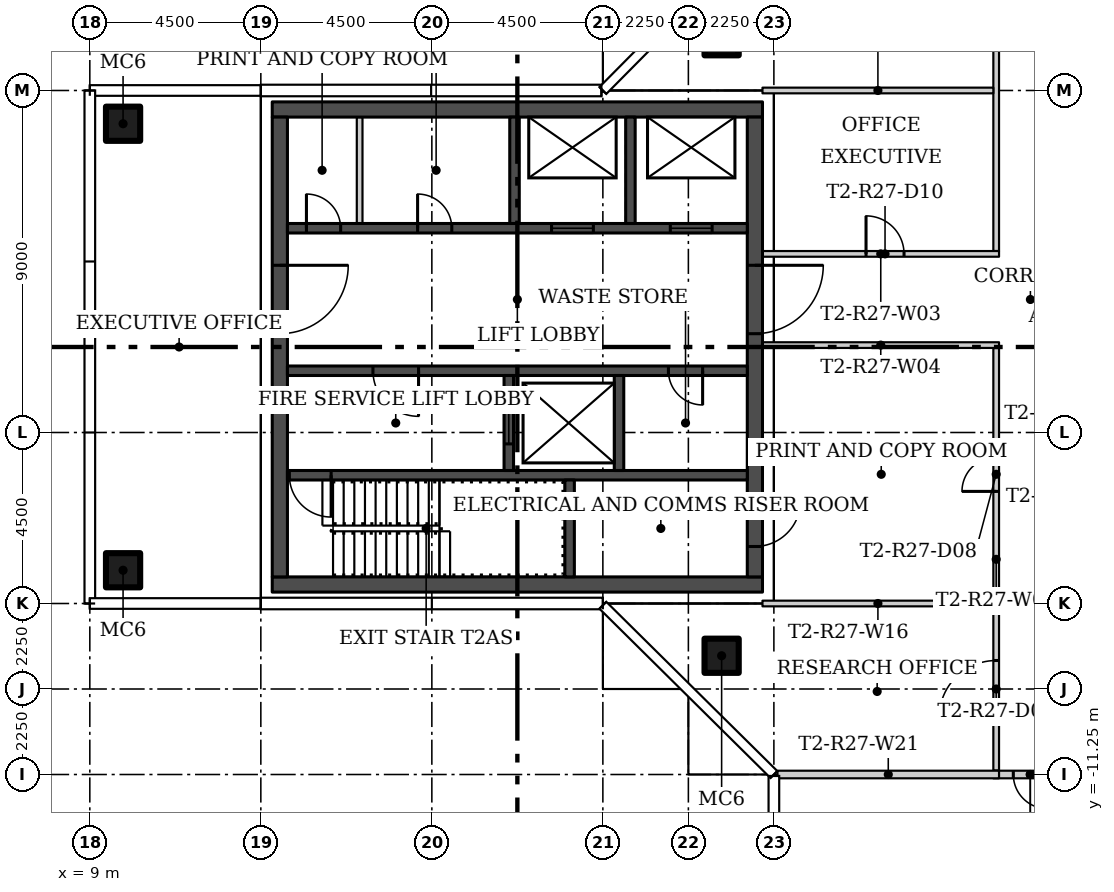
"""IFC4 building model, lengths in metres.
Left out: names, types, materials, properties, quantities, classifications, styles, units other than length and angle.
Written with IfcOpenShell. Run it as: python <this file> out.ifc"""

import sys

from ifc_helpers import new_model, si_unit, direction, frame, frame_2d, origin, origin_2d, place, context, subcontext, project, spatial, rectangle, hollow_rectangle, extrude, element, fill, save


model = new_model("IFC4")
c1 = context("Model", 3, precision=1e-05, world=origin(), true_north=direction((0.0, 1.0)))
c2 = subcontext(c1, "Body", "Model", "MODEL_VIEW")
j1 = project(units=[si_unit("LENGTHUNIT", "METRE"), si_unit("PLANEANGLEUNIT", "RADIAN")], contexts=[c1])
p1 = place(None, origin())
s1 = spatial("IfcSite", under=j1, at=p1, CompositionType="ELEMENT")
p2 = place(p1, origin())
s2 = spatial("IfcBuilding", under=s1, at=p2, CompositionType="ELEMENT")
p3 = place(p2, frame((0.0, 0.0, 249.9)))
s3 = spatial("IfcBuildingStorey", under=s2, at=p3, CompositionType="ELEMENT", Elevation=249.9)
for number, where in (
    (1, (25.625, 8.125, 0.0)),
    (2, (25.625, -8.125, 0.0)),
    (3, (9.875, -5.875, 0.0)),
    (4, (9.875, 5.875, 0.0)),
):
    element("IfcColumn", number, at=place(p3, frame(where)), inside=s3, PredefinedType="COLUMN", context=c2, shape_type="SweptSolid", body=[
        extrude(hollow_rectangle(XDim=0.9, YDim=0.9, WallThickness=0.036, at=origin_2d()), origin(), (0.0, 0.0, 1.0), 3.55),
    ])
p4 = place(p3, frame((32.85, 2.525, 0.0), z_axis=(0.0, 0.0, 1.0), x_axis=(0.0, 1.0, 0.0)))
e5 = element("IfcWall", 5, at=p4, inside=s3, PredefinedType="PARTITIONING", context=c2, shape_type="SweptSolid", body=[
    extrude(rectangle(XDim=13.125, YDim=0.15, at=frame_2d((6.562, 0.0))), origin(), (0.0, 0.0, 1.0), 3.55),
])
p5 = place(p4, frame((7.975, 0.0, 0.0)))
e6 = element("IfcOpeningElement", 6, at=p5, cuts=e5, PredefinedType="OPENING", context=c2, shape_type="SweptSolid", body=[
    extrude(rectangle(XDim=1.5, YDim=2.1, at=frame_2d((0.75, 1.05))), frame((0.0, 0.085, 0.0), z_axis=(0.0, -1.0, 0.0), x_axis=(1.0, 0.0, 0.0)), (0.0, 0.0, 1.0), 0.17),
])
p6 = place(p3, frame((32.85, -11.15, 0.0), z_axis=(0.0, 0.0, 1.0), x_axis=(0.0, 1.0, 0.0)))
e7 = element("IfcWall", 7, at=p6, inside=s3, PredefinedType="PARTITIONING", context=c2, shape_type="SweptSolid", body=[
    extrude(rectangle(XDim=11.125, YDim=0.15, at=frame_2d((5.562, 0.0))), origin(), (0.0, 0.0, 1.0), 3.55),
])
p7 = place(p6, frame((7.35, 0.0, 0.0)))
e8 = element("IfcOpeningElement", 8, at=p7, cuts=e7, PredefinedType="OPENING", context=c2, shape_type="SweptSolid", body=[
    extrude(rectangle(XDim=0.9, YDim=2.1, at=frame_2d((0.45, 1.05))), frame((0.0, 0.085, 0.0), z_axis=(0.0, -1.0, 0.0), x_axis=(1.0, 0.0, 0.0)), (0.0, 0.0, 1.0), 0.17),
])
p8 = place(p6, frame((1.4, 0.0, 0.0)))
e9 = element("IfcOpeningElement", 9, at=p8, cuts=e7, PredefinedType="OPENING", context=c2, shape_type="SweptSolid", body=[
    extrude(rectangle(XDim=1.5, YDim=2.1, at=frame_2d((0.75, 1.05))), frame((0.0, 0.085, 0.0), z_axis=(0.0, -1.0, 0.0), x_axis=(1.0, 0.0, 0.0)), (0.0, 0.0, 1.0), 0.17),
])
p9 = place(p3, frame((26.7, 2.45, 0.0)))
e10 = element("IfcWall", 10, at=p9, inside=s3, PredefinedType="PARTITIONING", context=c2, shape_type="SweptSolid", body=[
    extrude(rectangle(XDim=6.225, YDim=0.15, at=frame_2d((3.112, 0.0))), origin(), (0.0, 0.0, 1.0), 3.55),
])
p10 = place(p9, frame((2.725, 0.0, 0.0)))
e11 = element("IfcOpeningElement", 11, at=p10, cuts=e10, PredefinedType="OPENING", context=c2, shape_type="SweptSolid", body=[
    extrude(rectangle(XDim=1.0, YDim=2.4, at=frame_2d((0.5, 1.2))), frame((0.0, 0.085, 0.0), z_axis=(0.0, -1.0, 0.0), x_axis=(1.0, 0.0, 0.0)), (0.0, 0.0, 1.0), 0.17),
])
p11 = place(p3, frame((32.925, 0.05, 0.0), z_axis=(0.0, 0.0, 1.0), x_axis=(-1.0, 0.0, 0.0)))
e12 = element("IfcWall", 12, at=p11, inside=s3, PredefinedType="PARTITIONING", context=c2, shape_type="SweptSolid", body=[
    extrude(rectangle(XDim=6.225, YDim=0.15, at=frame_2d((3.112, 0.0))), origin(), (0.0, 0.0, 1.0), 3.55),
])
p12 = place(p3, frame((34.713, -11.25, 0.0), z_axis=(0.0, 0.0, 1.0), x_axis=(-1.0, 0.0, 0.0)))
e13 = element("IfcWall", 13, at=p12, inside=s3, PredefinedType="PARTITIONING", context=c2, shape_type="SweptSolid", body=[
    extrude(rectangle(XDim=1.938, YDim=0.2, at=frame_2d((0.969, 0.0))), origin(), (0.0, 0.0, 1.0), 3.55),
])
p13 = place(p12, frame((0.513, 0.0, 0.0)))
e14 = element("IfcOpeningElement", 14, at=p13, cuts=e13, PredefinedType="OPENING", context=c2, shape_type="SweptSolid", body=[
    extrude(rectangle(XDim=0.9, YDim=2.4, at=frame_2d((0.45, 1.2))), frame((0.0, 0.11, 0.0), z_axis=(0.0, -1.0, 0.0), x_axis=(1.0, 0.0, 0.0)), (0.0, 0.0, 1.0), 0.22),
])
p14 = place(p3, frame((32.775, 6.75, 0.0), z_axis=(0.0, 0.0, 1.0), x_axis=(-1.0, 0.0, 0.0)))
e15 = element("IfcWall", 15, at=p14, inside=s3, PredefinedType="PARTITIONING", context=c2, shape_type="SweptSolid", body=[
    extrude(rectangle(XDim=6.075, YDim=0.15, at=frame_2d((3.037, 0.0))), origin(), (0.0, 0.0, 1.0), 3.55),
])
p15 = place(p3, frame((26.7, -6.75, 0.0)))
e16 = element("IfcWall", 16, at=p15, inside=s3, PredefinedType="PARTITIONING", context=c2, shape_type="SweptSolid", body=[
    extrude(rectangle(XDim=6.075, YDim=0.15, at=frame_2d((3.037, 0.0))), origin(), (0.0, 0.0, 1.0), 3.55),
])
p16 = place(p3, frame((27.095, -11.25, 0.0)))
e17 = element("IfcWall", 17, at=p16, inside=s3, PredefinedType="PARTITIONING", context=c2, shape_type="SweptSolid", body=[
    extrude(rectangle(XDim=5.83, YDim=0.2, at=frame_2d((2.915, 0.0))), origin(), (0.0, 0.0, 1.0), 3.55),
])
for number, where in (
    (18, (13.8, -6.25, 0.0)),
    (19, (13.8, 6.25, 0.0)),
):
    element("IfcWall", number, at=place(p3, frame(where)), inside=s3, PredefinedType="SHEAR", context=c2, shape_type="SweptSolid", body=[
        extrude(rectangle(XDim=12.9, YDim=0.4, at=frame_2d((6.45, 0.0))), origin(), (0.0, 0.0, 1.0), 3.55),
    ])
p17 = place(p3, frame((14.0, 6.05, 0.0), z_axis=(0.0, 0.0, 1.0), x_axis=(0.0, -1.0, 0.0)))
e20 = element("IfcWall", 20, at=p17, inside=s3, PredefinedType="SHEAR", context=c2, shape_type="SweptSolid", body=[
    extrude(rectangle(XDim=12.1, YDim=0.4, at=frame_2d((6.05, 0.0))), origin(), (0.0, 0.0, 1.0), 3.55),
])
p18 = place(p17, frame((3.9, 0.0, 0.0)))
e21 = element("IfcOpeningElement", 21, at=p18, cuts=e20, PredefinedType="OPENING", context=c2, shape_type="SweptSolid", body=[
    extrude(rectangle(XDim=1.8, YDim=2.4, at=frame_2d((0.9, 1.2))), frame((0.0, 0.21, 0.0), z_axis=(0.0, -1.0, 0.0), x_axis=(1.0, 0.0, 0.0)), (0.0, 0.0, 1.0), 0.42),
])
p19 = place(p3, frame((26.5, 6.05, 0.0), z_axis=(0.0, 0.0, 1.0), x_axis=(0.0, -1.0, 0.0)))
e22 = element("IfcWall", 22, at=p19, inside=s3, PredefinedType="SHEAR", context=c2, shape_type="SweptSolid", body=[
    extrude(rectangle(XDim=12.1, YDim=0.4, at=frame_2d((6.05, 0.0))), origin(), (0.0, 0.0, 1.0), 3.55),
])
p20 = place(p19, frame((10.1, 0.0, 0.0)))
e23 = element("IfcOpeningElement", 23, at=p20, cuts=e22, PredefinedType="OPENING", context=c2, shape_type="SweptSolid", body=[
    extrude(rectangle(XDim=1.2, YDim=2.1, at=frame_2d((0.6, 1.05))), frame((0.0, 0.21, 0.0), z_axis=(0.0, -1.0, 0.0), x_axis=(1.0, 0.0, 0.0)), (0.0, 0.0, 1.0), 0.42),
])
p21 = place(p19, frame((3.9, 0.0, 0.0)))
e24 = element("IfcOpeningElement", 24, at=p21, cuts=e22, PredefinedType="OPENING", context=c2, shape_type="SweptSolid", body=[
    extrude(rectangle(XDim=1.8, YDim=2.4, at=frame_2d((0.9, 1.2))), frame((0.0, 0.21, 0.0), z_axis=(0.0, -1.0, 0.0), x_axis=(1.0, 0.0, 0.0)), (0.0, 0.0, 1.0), 0.42),
])
p22 = place(p3, frame((26.3, -3.375, 0.0), z_axis=(0.0, 0.0, 1.0), x_axis=(-1.0, 0.0, 0.0)))
e25 = element("IfcWall", 25, at=p22, inside=s3, PredefinedType="SHEAR", context=c2, shape_type="SweptSolid", body=[
    extrude(rectangle(XDim=12.1, YDim=0.25, at=frame_2d((6.05, 0.0))), origin(), (0.0, 0.0, 1.0), 3.55),
])
p23 = place(p22, frame((10.95, 0.0, 0.0)))
e26 = element("IfcOpeningElement", 26, at=p23, cuts=e25, PredefinedType="OPENING", context=c2, shape_type="SweptSolid", body=[
    extrude(rectangle(XDim=1.1, YDim=2.1, at=frame_2d((0.55, 1.05))), frame((0.0, 0.135, 0.0), z_axis=(0.0, -1.0, 0.0), x_axis=(1.0, 0.0, 0.0)), (0.0, 0.0, 1.0), 0.27),
])
p24 = place(p3, frame((21.625, -6.05, 0.0), z_axis=(0.0, 0.0, 1.0), x_axis=(0.0, 1.0, 0.0)))
e27 = element("IfcWall", 27, at=p24, inside=s3, PredefinedType="SHEAR", context=c2, shape_type="SweptSolid", body=[
    extrude(rectangle(XDim=2.55, YDim=0.25, at=frame_2d((1.275, 0.0))), origin(), (0.0, 0.0, 1.0), 3.55),
])
p25 = place(p3, frame((26.3, -0.625, 0.0), z_axis=(0.0, 0.0, 1.0), x_axis=(-1.0, 0.0, 0.0)))
e28 = element("IfcWall", 28, at=p25, inside=s3, PredefinedType="SHEAR", context=c2, shape_type="SweptSolid", body=[
    extrude(rectangle(XDim=12.1, YDim=0.25, at=frame_2d((6.05, 0.0))), origin(), (0.0, 0.0, 1.0), 3.55),
])
p26 = place(p25, frame((8.65, 0.0, 0.0)))
e29 = element("IfcOpeningElement", 29, at=p26, cuts=e28, PredefinedType="OPENING", context=c2, shape_type="SweptSolid", body=[
    extrude(rectangle(XDim=1.2, YDim=2.1, at=frame_2d((0.6, 1.05))), frame((0.0, 0.135, 0.0), z_axis=(0.0, -1.0, 0.0), x_axis=(1.0, 0.0, 0.0)), (0.0, 0.0, 1.0), 0.27),
])
p27 = place(p25, frame((1.175, 0.0, 0.0)))
e30 = element("IfcOpeningElement", 30, at=p27, cuts=e28, PredefinedType="OPENING", context=c2, shape_type="SweptSolid", body=[
    extrude(rectangle(XDim=0.9, YDim=2.1, at=frame_2d((0.45, 1.05))), frame((0.0, 0.135, 0.0), z_axis=(0.0, -1.0, 0.0), x_axis=(1.0, 0.0, 0.0)), (0.0, 0.0, 1.0), 0.27),
])
p28 = place(p3, frame((20.025, -3.25, 0.0), z_axis=(0.0, 0.0, 1.0), x_axis=(0.0, 1.0, 0.0)))
e31 = element("IfcWall", 31, at=p28, inside=s3, PredefinedType="SHEAR", context=c2, shape_type="SweptSolid", body=[
    extrude(rectangle(XDim=2.5, YDim=0.25, at=frame_2d((1.25, 0.0))), origin(), (0.0, 0.0, 1.0), 3.55),
])
p29 = place(p28, frame((0.7, 0.0, 0.0)))
e32 = element("IfcOpeningElement", 32, at=p29, cuts=e31, PredefinedType="OPENING", context=c2, shape_type="SweptSolid", body=[
    extrude(rectangle(XDim=1.1, YDim=2.1, at=frame_2d((0.55, 1.05))), frame((0.0, 0.135, 0.0), z_axis=(0.0, -1.0, 0.0), x_axis=(1.0, 0.0, 0.0)), (0.0, 0.0, 1.0), 0.27),
])
p30 = place(p3, frame((22.925, -3.25, 0.0), z_axis=(0.0, 0.0, 1.0), x_axis=(0.0, 1.0, 0.0)))
e33 = element("IfcWall", 33, at=p30, inside=s3, PredefinedType="SHEAR", context=c2, shape_type="SweptSolid", body=[
    extrude(rectangle(XDim=2.5, YDim=0.25, at=frame_2d((1.25, 0.0))), origin(), (0.0, 0.0, 1.0), 3.55),
])
p31 = place(p3, frame((14.2, 3.125, 0.0)))
e34 = element("IfcWall", 34, at=p31, inside=s3, PredefinedType="SHEAR", context=c2, shape_type="SweptSolid", body=[
    extrude(rectangle(XDim=12.1, YDim=0.25, at=frame_2d((6.05, 0.0))), origin(), (0.0, 0.0, 1.0), 3.55),
])
p32 = place(p31, frame((6.95, 0.0, 0.0)))
e35 = element("IfcOpeningElement", 35, at=p32, cuts=e34, PredefinedType="OPENING", context=c2, shape_type="SweptSolid", body=[
    extrude(rectangle(XDim=1.1, YDim=2.1, at=frame_2d((0.55, 1.05))), frame((0.0, 0.135, 0.0), z_axis=(0.0, -1.0, 0.0), x_axis=(1.0, 0.0, 0.0)), (0.0, 0.0, 1.0), 0.27),
])
p33 = place(p31, frame((10.075, 0.0, 0.0)))
e36 = element("IfcOpeningElement", 36, at=p33, cuts=e34, PredefinedType="OPENING", context=c2, shape_type="SweptSolid", body=[
    extrude(rectangle(XDim=1.1, YDim=2.1, at=frame_2d((0.55, 1.05))), frame((0.0, 0.135, 0.0), z_axis=(0.0, -1.0, 0.0), x_axis=(1.0, 0.0, 0.0)), (0.0, 0.0, 1.0), 0.27),
])
p34 = place(p31, frame((0.5, 0.0, 0.0)))
e37 = element("IfcOpeningElement", 37, at=p34, cuts=e34, PredefinedType="OPENING", context=c2, shape_type="SweptSolid", body=[
    extrude(rectangle(XDim=0.9, YDim=2.1, at=frame_2d((0.45, 1.05))), frame((0.0, 0.135, 0.0), z_axis=(0.0, -1.0, 0.0), x_axis=(1.0, 0.0, 0.0)), (0.0, 0.0, 1.0), 0.27),
])
p35 = place(p31, frame((3.425, 0.0, 0.0)))
e38 = element("IfcOpeningElement", 38, at=p35, cuts=e34, PredefinedType="OPENING", context=c2, shape_type="SweptSolid", body=[
    extrude(rectangle(XDim=0.9, YDim=2.1, at=frame_2d((0.45, 1.05))), frame((0.0, 0.135, 0.0), z_axis=(0.0, -1.0, 0.0), x_axis=(1.0, 0.0, 0.0)), (0.0, 0.0, 1.0), 0.27),
])
for number, where, z_axis, x_axis in (
    (39, (20.175, 3.25, 0.0), (0.0, 0.0, 1.0), (0.0, 1.0, 0.0)),
    (40, (23.225, 3.25, 0.0), (0.0, 0.0, 1.0), (0.0, 1.0, 0.0)),
):
    element("IfcWall", number, at=place(p3, frame(where, z_axis=z_axis, x_axis=x_axis)), inside=s3, PredefinedType="SHEAR", context=c2, shape_type="SweptSolid", body=[
        extrude(rectangle(XDim=2.8, YDim=0.25, at=frame_2d((1.4, 0.0))), origin(), (0.0, 0.0, 1.0), 3.55),
    ])
p36 = place(p3, frame((16.1, 3.25, 0.0), z_axis=(0.0, 0.0, 1.0), x_axis=(0.0, 1.0, 0.0)))
e41 = element("IfcWall", 41, at=p36, inside=s3, PredefinedType="PARTITIONING", context=c2, shape_type="SweptSolid", body=[
    extrude(rectangle(XDim=2.8, YDim=0.15, at=frame_2d((1.4, 0.0))), origin(), (0.0, 0.0, 1.0), 3.55),
])
p37 = place(p13, origin())
e42 = element("IfcDoor", 42, at=p37, inside=s3, OperationType="SINGLE_SWING_RIGHT", PredefinedType="DOOR", context=c2, shape_type="SweptSolid", body=[
    extrude(rectangle(XDim=0.9, YDim=2.4, at=frame_2d((0.45, 1.2))), frame((0.0, 0.025, 0.0), z_axis=(0.0, -1.0, 0.0), x_axis=(1.0, 0.0, 0.0)), (0.0, 0.0, 1.0), 0.05),
])
fill(e14, e42)
p38 = place(p7, origin())
e43 = element("IfcDoor", 43, at=p38, inside=s3, OperationType="SINGLE_SWING_RIGHT", PredefinedType="DOOR", context=c2, shape_type="SweptSolid", body=[
    extrude(rectangle(XDim=0.9, YDim=2.1, at=frame_2d((0.45, 1.05))), frame((0.0, 0.025, 0.0), z_axis=(0.0, -1.0, 0.0), x_axis=(1.0, 0.0, 0.0)), (0.0, 0.0, 1.0), 0.05),
])
fill(e8, e43)
p39 = place(p8, origin())
e44 = element("IfcDoor", 44, at=p39, inside=s3, OperationType="DOUBLE_DOOR_SINGLE_SWING", PredefinedType="DOOR", context=c2, shape_type="SweptSolid", body=[
    extrude(rectangle(XDim=1.5, YDim=2.1, at=frame_2d((0.75, 1.05))), frame((0.0, 0.025, 0.0), z_axis=(0.0, -1.0, 0.0), x_axis=(1.0, 0.0, 0.0)), (0.0, 0.0, 1.0), 0.05),
])
fill(e9, e44)
p40 = place(p10, origin())
e45 = element("IfcDoor", 45, at=p40, inside=s3, OperationType="SINGLE_SWING_LEFT", PredefinedType="DOOR", context=c2, shape_type="SweptSolid", body=[
    extrude(rectangle(XDim=1.0, YDim=2.4, at=frame_2d((0.5, 1.2))), frame((0.0, 0.025, 0.0), z_axis=(0.0, -1.0, 0.0), x_axis=(1.0, 0.0, 0.0)), (0.0, 0.0, 1.0), 0.05),
])
fill(e11, e45)
p41 = place(p18, origin())
e46 = element("IfcDoor", 46, at=p41, inside=s3, OperationType="DOUBLE_DOOR_SINGLE_SWING", PredefinedType="DOOR", context=c2, shape_type="SweptSolid", body=[
    extrude(rectangle(XDim=1.8, YDim=2.4, at=frame_2d((0.9, 1.2))), frame((0.0, 0.025, 0.0), z_axis=(0.0, -1.0, 0.0), x_axis=(1.0, 0.0, 0.0)), (0.0, 0.0, 1.0), 0.05),
])
fill(e21, e46)
p42 = place(p20, origin())
e47 = element("IfcDoor", 47, at=p42, inside=s3, OperationType="SINGLE_SWING_RIGHT", PredefinedType="DOOR", context=c2, shape_type="SweptSolid", body=[
    extrude(rectangle(XDim=1.2, YDim=2.1, at=frame_2d((0.6, 1.05))), frame((0.0, 0.025, 0.0), z_axis=(0.0, -1.0, 0.0), x_axis=(1.0, 0.0, 0.0)), (0.0, 0.0, 1.0), 0.05),
])
fill(e23, e47)
p43 = place(p21, origin())
e48 = element("IfcDoor", 48, at=p43, inside=s3, OperationType="DOUBLE_DOOR_SINGLE_SWING", PredefinedType="DOOR", context=c2, shape_type="SweptSolid", body=[
    extrude(rectangle(XDim=1.8, YDim=2.4, at=frame_2d((0.9, 1.2))), frame((0.0, 0.025, 0.0), z_axis=(0.0, -1.0, 0.0), x_axis=(1.0, 0.0, 0.0)), (0.0, 0.0, 1.0), 0.05),
])
fill(e24, e48)
p44 = place(p23, origin())
e49 = element("IfcDoor", 49, at=p44, inside=s3, OperationType="SINGLE_SWING_RIGHT", PredefinedType="DOOR", context=c2, shape_type="SweptSolid", body=[
    extrude(rectangle(XDim=1.1, YDim=2.1, at=frame_2d((0.55, 1.05))), frame((0.0, 0.025, 0.0), z_axis=(0.0, -1.0, 0.0), x_axis=(1.0, 0.0, 0.0)), (0.0, 0.0, 1.0), 0.05),
])
fill(e26, e49)
p45 = place(p26, origin())
e50 = element("IfcDoor", 50, at=p45, inside=s3, OperationType="SINGLE_SWING_RIGHT", PredefinedType="DOOR", context=c2, shape_type="SweptSolid", body=[
    extrude(rectangle(XDim=1.2, YDim=2.1, at=frame_2d((0.6, 1.05))), frame((0.0, 0.025, 0.0), z_axis=(0.0, -1.0, 0.0), x_axis=(1.0, 0.0, 0.0)), (0.0, 0.0, 1.0), 0.05),
])
fill(e29, e50)
p46 = place(p27, origin())
e51 = element("IfcDoor", 51, at=p46, inside=s3, OperationType="SINGLE_SWING_LEFT", PredefinedType="DOOR", context=c2, shape_type="SweptSolid", body=[
    extrude(rectangle(XDim=0.9, YDim=2.1, at=frame_2d((0.45, 1.05))), frame((0.0, 0.025, 0.0), z_axis=(0.0, -1.0, 0.0), x_axis=(1.0, 0.0, 0.0)), (0.0, 0.0, 1.0), 0.05),
])
fill(e30, e51)
p47 = place(p29, origin())
e52 = element("IfcDoor", 52, at=p47, inside=s3, OperationType="SLIDING_TO_LEFT", PredefinedType="DOOR", context=c2, shape_type="SweptSolid", body=[
    extrude(rectangle(XDim=1.1, YDim=2.1, at=frame_2d((0.55, 1.05))), frame((0.0, 0.025, 0.0), z_axis=(0.0, -1.0, 0.0), x_axis=(1.0, 0.0, 0.0)), (0.0, 0.0, 1.0), 0.05),
])
fill(e32, e52)
p48 = place(p32, origin())
e53 = element("IfcDoor", 53, at=p48, inside=s3, OperationType="SLIDING_TO_LEFT", PredefinedType="DOOR", context=c2, shape_type="SweptSolid", body=[
    extrude(rectangle(XDim=1.1, YDim=2.1, at=frame_2d((0.55, 1.05))), frame((0.0, 0.025, 0.0), z_axis=(0.0, -1.0, 0.0), x_axis=(1.0, 0.0, 0.0)), (0.0, 0.0, 1.0), 0.05),
])
fill(e35, e53)
p49 = place(p33, origin())
e54 = element("IfcDoor", 54, at=p49, inside=s3, OperationType="SLIDING_TO_LEFT", PredefinedType="DOOR", context=c2, shape_type="SweptSolid", body=[
    extrude(rectangle(XDim=1.1, YDim=2.1, at=frame_2d((0.55, 1.05))), frame((0.0, 0.025, 0.0), z_axis=(0.0, -1.0, 0.0), x_axis=(1.0, 0.0, 0.0)), (0.0, 0.0, 1.0), 0.05),
])
fill(e36, e54)
p50 = place(p34, origin())
e55 = element("IfcDoor", 55, at=p50, inside=s3, OperationType="SINGLE_SWING_LEFT", PredefinedType="DOOR", context=c2, shape_type="SweptSolid", body=[
    extrude(rectangle(XDim=0.9, YDim=2.1, at=frame_2d((0.45, 1.05))), frame((0.0, 0.025, 0.0), z_axis=(0.0, -1.0, 0.0), x_axis=(1.0, 0.0, 0.0)), (0.0, 0.0, 1.0), 0.05),
])
fill(e37, e55)
p51 = place(p35, origin())
e56 = element("IfcDoor", 56, at=p51, inside=s3, OperationType="SINGLE_SWING_LEFT", PredefinedType="DOOR", context=c2, shape_type="SweptSolid", body=[
    extrude(rectangle(XDim=0.9, YDim=2.1, at=frame_2d((0.45, 1.05))), frame((0.0, 0.025, 0.0), z_axis=(0.0, -1.0, 0.0), x_axis=(1.0, 0.0, 0.0)), (0.0, 0.0, 1.0), 0.05),
])
fill(e38, e56)
save(model, sys.argv[1])
